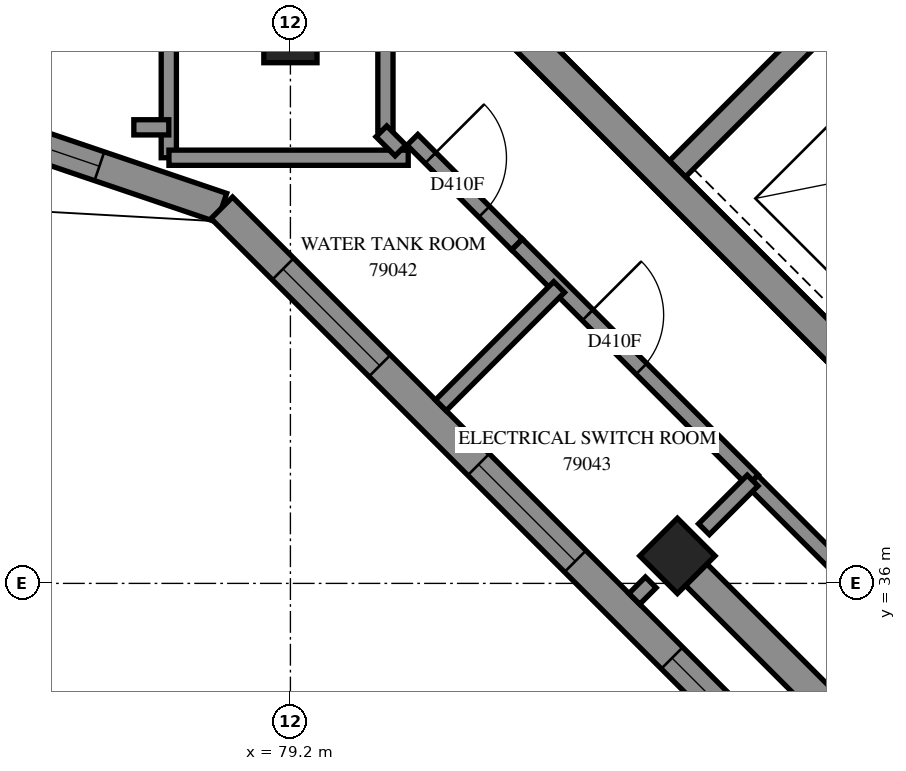
"""IFC4 building model, lengths in metres.
Left out: names, types, materials, properties, quantities, classifications, styles, units other than length and angle.
Written with IfcOpenShell. Run it as: python <this file> out.ifc"""

import sys

from ifc_helpers import new_model, si_unit, direction, frame, frame_2d, origin, origin_2d, place, context, subcontext, project, spatial, polyline, rectangle, outline, extrude, element, fill, save


model = new_model("IFC4")
c1 = context("Model", 3, precision=1e-05, world=origin(), true_north=direction((0.0, 1.0)))
c2 = subcontext(c1, "Body", "Model", "MODEL_VIEW")
j1 = project(units=[si_unit("LENGTHUNIT", "METRE"), si_unit("PLANEANGLEUNIT", "RADIAN")], contexts=[c1])
p1 = place(None, origin())
s1 = spatial("IfcSite", under=j1, at=p1, CompositionType="ELEMENT")
p2 = place(p1, origin())
s2 = spatial("IfcBuilding", under=s1, at=p2, CompositionType="ELEMENT")
p3 = place(p2, frame((0.0, 0.0, 290.6)))
s3 = spatial("IfcBuildingStorey", under=s2, at=p3, CompositionType="ELEMENT", Elevation=290.6)
for number, where, z_axis, x_axis in (
    (1, (79.2, 43.2, 0.0), (0.0, 0.0, 1.0), (1.0, 0.0, 0.0)),
    (2, (84.291, 36.362, 0.0), (0.0, 0.0, 1.0), (0.707, -0.707, 0.0)),
):
    element("IfcColumn", number, at=place(p3, frame(where, z_axis=z_axis, x_axis=x_axis)), inside=s3, PredefinedType="COLUMN", context=c2, shape_type="SweptSolid", body=[
        extrude(rectangle(XDim=0.7, YDim=0.7, at=origin_2d()), origin(), (0.0, 0.0, 1.0), 3.5),
    ])
p4 = place(p3, frame((76.23, 49.231, -0.3), z_axis=(0.0, 0.0, 1.0), x_axis=(0.7071034917, -0.7071100706, 0.0)))
e3 = element("IfcWall", 3, at=p4, inside=s3, PredefinedType="SHEAR", context=c2, shape_type="SweptSolid", body=[
    extrude(rectangle(XDim=15.2, YDim=0.4, at=frame_2d((7.6, 0.0))), origin(), (0.0, 0.0, 1.0), 3.1),
])
p5 = place(p3, frame((84.291, 41.453, 0.0), z_axis=(0.0, 0.0, 1.0), x_axis=(0.7071067812, 0.7071067812, 0.0)))
e4 = element("IfcWall", 4, at=p5, inside=s3, PredefinedType="SOLIDWALL", context=c2, shape_type="SweptSolid", body=[
    extrude(rectangle(XDim=3.3, YDim=0.3, at=frame_2d((1.65, 0.0))), origin(), (0.0, 0.0, 1.0), 3.5),
])
p6 = place(p3, frame((78.988, 51.423, 0.0), z_axis=(0.0, 0.0, 1.0), x_axis=(0.7071067812, -0.7071067812, 0.0)))
e5 = element("IfcWall", 5, at=p6, inside=s3, PredefinedType="SOLIDWALL", context=c2, shape_type="SweptSolid", body=[
    extrude(rectangle(XDim=14.4, YDim=0.3, at=frame_2d((7.2, 0.0))), origin(), (0.0, 0.0, 1.0), 3.5),
])
p7 = place(p6, frame((12.05, 0.0, 0.0)))
e6 = element("IfcOpeningElement", 6, at=p7, cuts=e5, PredefinedType="OPENING", context=c2, shape_type="SweptSolid", body=[
    extrude(rectangle(XDim=1.1, YDim=2.1, at=frame_2d((0.55, 1.05))), frame((0.0, 0.16, 0.0), z_axis=(0.0, -1.0, 0.0), x_axis=(1.0, 0.0, 0.0)), (0.0, 0.0, 1.0), 0.32),
])
p8 = place(p3, frame((74.59, 42.2, 0.0), z_axis=(0.0, 0.0, 1.0), x_axis=(0.9469112296, -0.3214951372, 0.0)))
e7 = element("IfcWall", 7, at=p8, inside=s3, PredefinedType="SOLIDWALL", context=c2, shape_type="SweptSolid", body=[
    extrude(outline(polyline([(0.033, -0.2), (3.868, -0.2), (3.961, 0.2), (-0.033, 0.2), (0.033, -0.2)])), origin(), (0.0, 0.0, 1.0), 3.5),
])
p9 = place(p8, frame((0.414, 0.0, 0.7)))
e8 = element("IfcOpeningElement", 8, at=p9, cuts=e7, PredefinedType="OPENING", context=c2, shape_type="SweptSolid", body=[
    extrude(rectangle(XDim=1.8, YDim=2.2, at=frame_2d((0.9, 1.1))), frame((0.0, 0.21, 0.0), z_axis=(0.0, -1.0, 0.0), x_axis=(1.0, 0.0, 0.0)), (0.0, 0.0, 1.0), 0.42),
])
p10 = place(p3, frame((78.297, 40.941, 0.0), z_axis=(0.0, 0.0, 1.0), x_axis=(0.7071035917, -0.7071099707, 0.0)))
e9 = element("IfcWall", 9, at=p10, inside=s3, PredefinedType="SOLIDWALL", context=c2, shape_type="SweptSolid", body=[
    extrude(outline(polyline([(0.047, -0.2), (15.877, -0.2), (15.476, 0.2), (-0.047, 0.2), (0.047, -0.2)])), origin(), (0.0, 0.0, 1.0), 3.5),
])
p11 = place(p10, frame((1.138, 0.0, 0.7)))
e10 = element("IfcOpeningElement", 10, at=p11, cuts=e9, PredefinedType="OPENING", context=c2, shape_type="SweptSolid", body=[
    extrude(rectangle(XDim=1.8, YDim=2.2, at=frame_2d((0.9, 1.1))), frame((0.0, 0.21, 0.0), z_axis=(0.0, -1.0, 0.0), x_axis=(1.0, 0.0, 0.0)), (0.0, 0.0, 1.0), 0.42),
])
p12 = place(p10, frame((4.777, 0.0, 0.7)))
e11 = element("IfcOpeningElement", 11, at=p12, cuts=e9, PredefinedType="OPENING", context=c2, shape_type="SweptSolid", body=[
    extrude(rectangle(XDim=1.8, YDim=2.2, at=frame_2d((0.9, 1.1))), frame((0.0, 0.21, 0.0), z_axis=(0.0, -1.0, 0.0), x_axis=(1.0, 0.0, 0.0)), (0.0, 0.0, 1.0), 0.42),
])
p13 = place(p10, frame((8.377, 0.0, 0.7)))
e12 = element("IfcOpeningElement", 12, at=p13, cuts=e9, PredefinedType="OPENING", context=c2, shape_type="SweptSolid", body=[
    extrude(rectangle(XDim=1.8, YDim=2.2, at=frame_2d((0.9, 1.1))), frame((0.0, 0.21, 0.0), z_axis=(0.0, -1.0, 0.0), x_axis=(1.0, 0.0, 0.0)), (0.0, 0.0, 1.0), 0.42),
])
p14 = place(p10, frame((11.976, 0.0, 0.7)))
e13 = element("IfcOpeningElement", 13, at=p14, cuts=e9, PredefinedType="OPENING", context=c2, shape_type="SweptSolid", body=[
    extrude(rectangle(XDim=1.8, YDim=2.2, at=frame_2d((0.9, 1.1))), frame((0.0, 0.21, 0.0), z_axis=(0.0, -1.0, 0.0), x_axis=(1.0, 0.0, 0.0)), (0.0, 0.0, 1.0), 0.42),
])
p15 = place(p3, frame((82.18, 40.46, 0.0), z_axis=(0.0, 0.0, 1.0), x_axis=(0.7071067812, -0.7071067812, 0.0)))
e14 = element("IfcWall", 14, at=p15, inside=s3, PredefinedType="PARTITIONING", context=c2, shape_type="SweptSolid", body=[
    extrude(rectangle(XDim=4.391, YDim=0.2, at=frame_2d((2.196, 0.0))), origin(), (0.0, 0.0, 1.0), 3.5),
])
p16 = place(p15, frame((1.316, 0.0, 0.0)))
e15 = element("IfcOpeningElement", 15, at=p16, cuts=e14, PredefinedType="OPENING", context=c2, shape_type="SweptSolid", body=[
    extrude(rectangle(XDim=1.0, YDim=2.1, at=frame_2d((0.5, 1.05))), frame((0.0, 0.11, 0.0), z_axis=(0.0, -1.0, 0.0), x_axis=(1.0, 0.0, 0.0)), (0.0, 0.0, 1.0), 0.22),
])
p17 = place(p3, frame((77.6, 41.6, 0.0), z_axis=(0.0, 0.0, 1.0), x_axis=(0.0, 1.0, 0.0)))
e16 = element("IfcWall", 16, at=p17, inside=s3, PredefinedType="PARTITIONING", context=c2, shape_type="SweptSolid", body=[
    extrude(rectangle(XDim=3.15, YDim=0.2, at=frame_2d((1.575, 0.0))), origin(), (0.0, 0.0, 1.0), 3.0),
])
p18 = place(p3, frame((77.602, 41.6, 0.0), z_axis=(0.0, 0.0, 1.0), x_axis=(1.0, 0.0, 0.0)))
e17 = element("IfcWall", 17, at=p18, inside=s3, PredefinedType="PARTITIONING", context=c2, shape_type="SweptSolid", body=[
    extrude(rectangle(XDim=3.148, YDim=0.2, at=frame_2d((1.574, 0.0))), origin(), (0.0, 0.0, 1.0), 3.5),
])
p19 = place(p3, frame((80.45, 41.952, 0.0), z_axis=(0.0, 0.0, 1.0), x_axis=(0.0, 1.0, 0.0)))
e18 = element("IfcWall", 18, at=p19, inside=s3, PredefinedType="PARTITIONING", context=c2, shape_type="SweptSolid", body=[
    extrude(rectangle(XDim=2.498, YDim=0.2, at=frame_2d((1.249, 0.0))), origin(), (0.0, 0.0, 1.0), 3.5),
])
p20 = place(p3, frame((86.833, 35.793, 0.0), z_axis=(0.0, 0.0, 1.0), x_axis=(-0.7068338899, 0.7073795672, 0.0)))
e19 = element("IfcWall", 19, at=p20, inside=s3, PredefinedType="PARTITIONING", context=c2, shape_type="SweptSolid", body=[
    extrude(rectangle(XDim=2.199, YDim=0.2, at=frame_2d((1.1, 0.0))), origin(), (0.0, 0.0, 1.0), 3.5),
])
p21 = place(p3, frame((80.805, 41.835, 0.0), z_axis=(0.0, 0.0, 1.0), x_axis=(0.7065923348, -0.7076208535, 0.0)))
e20 = element("IfcWall", 20, at=p21, inside=s3, PredefinedType="PARTITIONING", context=c2, shape_type="SweptSolid", body=[
    extrude(rectangle(XDim=1.944, YDim=0.2, at=frame_2d((0.972, 0.0))), origin(), (0.0, 0.0, 1.0), 3.5),
])
p22 = place(p21, frame((0.336, 0.0, 0.0)))
e21 = element("IfcOpeningElement", 21, at=p22, cuts=e20, PredefinedType="OPENING", context=c2, shape_type="SweptSolid", body=[
    extrude(rectangle(XDim=1.0, YDim=2.1, at=frame_2d((0.5, 1.05))), frame((0.0, 0.11, 0.0), z_axis=(0.0, -1.0, 0.0), x_axis=(1.0, 0.0, 0.0)), (0.0, 0.0, 1.0), 0.22),
])
p23 = place(p3, frame((84.641, 36.713, 0.0), z_axis=(0.0, 0.0, 1.0), x_axis=(0.7071067812, 0.7071067812, 0.0)))
e22 = element("IfcWall", 22, at=p23, inside=s3, PredefinedType="PARTITIONING", context=c2, shape_type="SweptSolid", body=[
    extrude(rectangle(XDim=0.905, YDim=0.2, at=frame_2d((0.453, 0.0))), origin(), (0.0, 0.0, 1.0), 3.5),
])
p24 = place(p3, frame((80.397, 41.947, 0.0), z_axis=(0.0, 0.0, 1.0), x_axis=(0.7071067812, -0.7071067812, 0.0)))
e23 = element("IfcWall", 23, at=p24, inside=s3, PredefinedType="PARTITIONING", context=c2, shape_type="SweptSolid", body=[
    extrude(rectangle(XDim=0.355, YDim=0.2, at=frame_2d((0.177, 0.0))), origin(), (0.0, 0.0, 1.0), 3.5),
])
p25 = place(p3, frame((77.14, 42.0, 0.0), z_axis=(0.0, 0.0, 1.0), x_axis=(1.0, 0.0, 0.0)))
e24 = element("IfcWall", 24, at=p25, inside=s3, PredefinedType="PARTITIONING", context=c2, shape_type="SweptSolid", body=[
    extrude(rectangle(XDim=0.46, YDim=0.2, at=frame_2d((0.23, 0.0))), origin(), (0.0, 0.0, 1.0), 3.5),
])
p26 = place(p3, frame((86.271, 33.251, 0.0), z_axis=(0.0, 0.0, 1.0), x_axis=(0.7071908866, 0.7070226658, 0.0)))
e25 = element("IfcWall", 25, at=p26, inside=s3, PredefinedType="PARTITIONING", context=c2, shape_type="SweptSolid", body=[
    extrude(outline(polyline([(0.0, -0.1), (10.7, -0.1), (10.7, 0.1), (0.0, 0.1), (0.0, -0.1)])), origin(), (0.0, 0.0, 1.0), 3.5),
])
p27 = place(p3, frame((81.179, 38.343, 0.0), z_axis=(0.0, 0.0, 1.0), x_axis=(0.7071067812, 0.7071067812, 0.0)))
e26 = element("IfcWall", 26, at=p27, inside=s3, PredefinedType="PARTITIONING", context=c2, shape_type="SweptSolid", body=[
    extrude(outline(polyline([(0.0, -0.1), (2.201, -0.1), (2.201, 0.1), (0.0, 0.1), (0.0, -0.1)])), origin(), (0.0, 0.0, 1.0), 3.5),
])
p28 = place(p3, frame((83.725, 35.797, 0.0), z_axis=(0.0, 0.0, 1.0), x_axis=(0.7069432694, 0.7072702552, 0.0)))
e27 = element("IfcWall", 27, at=p28, inside=s3, PredefinedType="PARTITIONING", context=c2, shape_type="SweptSolid", body=[
    extrude(outline(polyline([(0.0, -0.1), (0.306, -0.1), (0.306, 0.1), (0.0, 0.1), (0.0, -0.1)])), origin(), (0.0, 0.0, 1.0), 3.5),
])
p29 = place(p11, origin())
e28 = element("IfcWindow", 28, at=p29, inside=s3, PartitioningType="SINGLE_PANEL", PredefinedType="WINDOW", context=c2, shape_type="SweptSolid", body=[
    extrude(rectangle(XDim=1.8, YDim=2.2, at=frame_2d((0.9, 1.1))), frame((0.0, 0.08, 0.0), z_axis=(0.0, -1.0, 0.0), x_axis=(1.0, 0.0, 0.0)), (0.0, 0.0, 1.0), 0.06),
])
fill(e10, e28)
p30 = place(p12, origin())
e29 = element("IfcWindow", 29, at=p30, inside=s3, PartitioningType="SINGLE_PANEL", PredefinedType="WINDOW", context=c2, shape_type="SweptSolid", body=[
    extrude(rectangle(XDim=1.8, YDim=2.2, at=frame_2d((0.9, 1.1))), frame((0.0, 0.08, 0.0), z_axis=(0.0, -1.0, 0.0), x_axis=(1.0, 0.0, 0.0)), (0.0, 0.0, 1.0), 0.06),
])
fill(e11, e29)
p31 = place(p13, origin())
e30 = element("IfcWindow", 30, at=p31, inside=s3, PartitioningType="SINGLE_PANEL", PredefinedType="WINDOW", context=c2, shape_type="SweptSolid", body=[
    extrude(rectangle(XDim=1.8, YDim=2.2, at=frame_2d((0.9, 1.1))), frame((0.0, 0.08, 0.0), z_axis=(0.0, -1.0, 0.0), x_axis=(1.0, 0.0, 0.0)), (0.0, 0.0, 1.0), 0.06),
])
fill(e12, e30)
p32 = place(p22, origin())
e31 = element("IfcDoor", 31, at=p32, inside=s3, OperationType="SINGLE_SWING_LEFT", PredefinedType="DOOR", context=c2, shape_type="SweptSolid", body=[
    extrude(rectangle(XDim=1.0, YDim=2.1, at=frame_2d((0.5, 1.05))), frame((0.0, 0.025, 0.0), z_axis=(0.0, -1.0, 0.0), x_axis=(1.0, 0.0, 0.0)), (0.0, 0.0, 1.0), 0.05),
])
fill(e21, e31)
p33 = place(p16, origin())
e32 = element("IfcDoor", 32, at=p33, inside=s3, OperationType="SINGLE_SWING_LEFT", PredefinedType="DOOR", context=c2, shape_type="SweptSolid", body=[
    extrude(rectangle(XDim=1.0, YDim=2.1, at=frame_2d((0.5, 1.05))), frame((0.0, 0.025, 0.0), z_axis=(0.0, -1.0, 0.0), x_axis=(1.0, 0.0, 0.0)), (0.0, 0.0, 1.0), 0.05),
])
fill(e15, e32)
p34 = place(p9, origin())
e33 = element("IfcWindow", 33, at=p34, inside=s3, PartitioningType="SINGLE_PANEL", PredefinedType="WINDOW", context=c2, shape_type="SweptSolid", body=[
    extrude(rectangle(XDim=1.8, YDim=2.2, at=frame_2d((0.9, 1.1))), frame((0.0, 0.08, 0.0), z_axis=(0.0, -1.0, 0.0), x_axis=(1.0, 0.0, 0.0)), (0.0, 0.0, 1.0), 0.06),
])
fill(e8, e33)
save(model, sys.argv[1])
